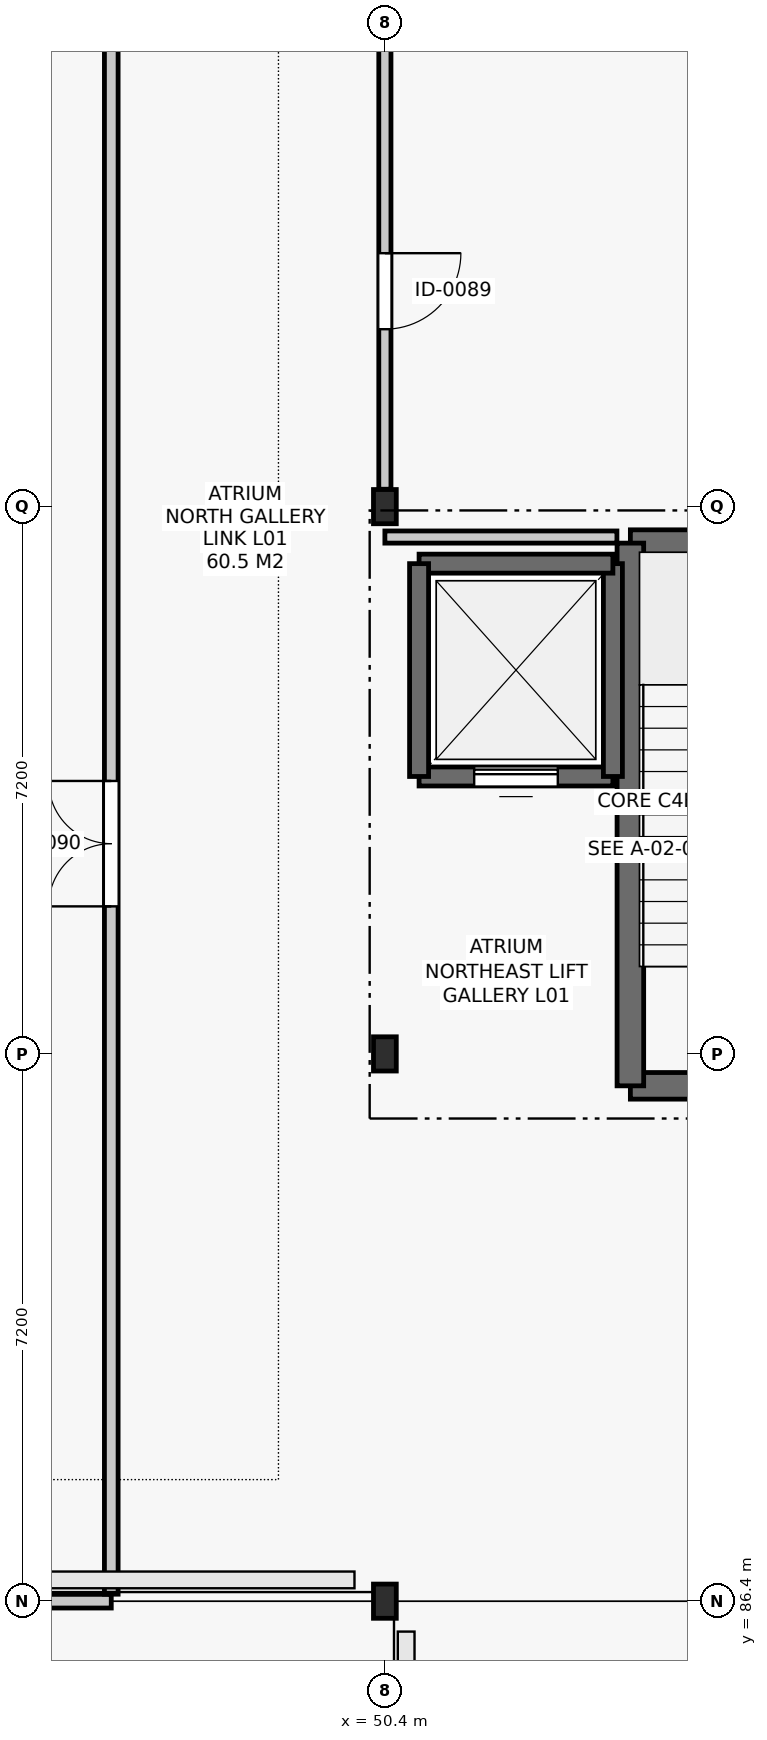
"""IFC4 building model, lengths in metres.
Left out: names, types, materials, properties, quantities, classifications, styles, units other than length and angle.
Written with IfcOpenShell. Run it as: python <this file> out.ifc"""

import sys

from ifc_helpers import new_model, si_unit, direction, frame, frame_2d, origin, origin_2d, place, context, subcontext, project, spatial, rectangle, i_section, extrude, element, fill, save


model = new_model("IFC4")
c1 = context("Model", 3, precision=1e-05, world=origin(), true_north=direction((0.0, 1.0)))
c2 = subcontext(c1, "Body", "Model", "MODEL_VIEW")
j1 = project(units=[si_unit("LENGTHUNIT", "METRE"), si_unit("PLANEANGLEUNIT", "RADIAN")], contexts=[c1])
p1 = place(None, origin())
s1 = spatial("IfcSite", under=j1, at=p1, CompositionType="ELEMENT")
p2 = place(p1, origin())
s2 = spatial("IfcBuilding", under=s1, at=p2, CompositionType="ELEMENT")
p3 = place(p2, frame((0.0, 0.0, 5.4)))
s3 = spatial("IfcBuildingStorey", under=s2, at=p3, CompositionType="ELEMENT", Elevation=5.4)
for number, where, z_axis, x_axis in (
    (1, (50.4, 86.4, 0.0), (0.0, 0.0, 1.0), (1.0, 0.0, 0.0)),
    (2, (50.4, 93.6, 0.0), (0.0, 0.0, 1.0), (1.0, 0.0, 0.0)),
    (3, (50.4, 100.8, 0.0), (0.0, 0.0, 1.0), (1.0, 0.0, 0.0)),
):
    element("IfcColumn", number, at=place(p3, frame(where, z_axis=z_axis, x_axis=x_axis)), inside=s3, PredefinedType="COLUMN", context=c2, shape_type="SweptSolid", body=[
        extrude(i_section(OverallWidth=0.3, OverallDepth=0.45, WebThickness=0.014, FlangeThickness=0.026, FilletRadius=0.027, at=origin_2d()), origin(), (0.0, 0.0, 1.0), 4.8),
    ])
p4 = place(p3, frame((53.63, 93.18, 0.0), z_axis=(0.0, 0.0, 1.0), x_axis=(1.0, 0.0, 0.0)))
e4 = element("IfcWall", 4, at=p4, inside=s3, PredefinedType="SHEAR", context=c2, shape_type="SweptSolid", body=[
    extrude(rectangle(XDim=3.44, YDim=0.35, at=frame_2d((1.72, 0.0))), origin(), (0.0, 0.0, 1.0), 4.52),
])
p5 = place(p4, frame((1.17, 0.0, 0.0)))
e5 = element("IfcOpeningElement", 5, at=p5, cuts=e4, PredefinedType="OPENING", context=c2, shape_type="SweptSolid", body=[
    extrude(rectangle(XDim=1.1, YDim=2.15, at=frame_2d((0.55, 1.075))), frame((0.0, 0.187, 0.0), z_axis=(0.0, -1.0, 0.0), x_axis=(1.0, 0.0, 0.0)), (0.0, 0.0, 1.0), 0.374),
])
p6 = place(p3, frame((57.07, 100.32, 0.0), z_axis=(0.0, 0.0, 1.0), x_axis=(-1.0, 0.0, 0.0)))
e6 = element("IfcWall", 6, at=p6, inside=s3, PredefinedType="SHEAR", context=c2, shape_type="SweptSolid", body=[
    extrude(rectangle(XDim=3.44, YDim=0.35, at=frame_2d((1.72, 0.0))), origin(), (0.0, 0.0, 1.0), 4.52),
])
p7 = place(p3, frame((53.63, 100.32, 0.0), z_axis=(0.0, 0.0, 1.0), x_axis=(0.0, -1.0, 0.0)))
e7 = element("IfcWall", 7, at=p7, inside=s3, PredefinedType="SHEAR", context=c2, shape_type="SweptSolid", body=[
    extrude(rectangle(XDim=7.14, YDim=0.35, at=frame_2d((3.57, 0.0))), origin(), (0.0, 0.0, 1.0), 4.52),
])
p8 = place(p3, frame((50.85, 97.25, 0.0), z_axis=(0.0, 0.0, 1.0), x_axis=(1.0, 0.0, 0.0)))
e8 = element("IfcWall", 8, at=p8, inside=s3, PredefinedType="SHEAR", context=c2, shape_type="SweptSolid", body=[
    extrude(rectangle(XDim=2.55, YDim=0.25, at=frame_2d((1.275, 0.0))), origin(), (0.0, 0.0, 1.0), 4.52),
])
p9 = place(p8, frame((0.725, 0.0, 0.0)))
e9 = element("IfcOpeningElement", 9, at=p9, cuts=e8, PredefinedType="OPENING", context=c2, shape_type="SweptSolid", body=[
    extrude(rectangle(XDim=1.1, YDim=2.1, at=frame_2d((0.55, 1.05))), frame((0.0, 0.137, 0.0), z_axis=(0.0, -1.0, 0.0), x_axis=(1.0, 0.0, 0.0)), (0.0, 0.0, 1.0), 0.274),
])
p10 = place(p3, frame((53.4, 97.25, 0.0), z_axis=(0.0, 0.0, 1.0), x_axis=(0.0, 1.0, 0.0)))
e10 = element("IfcWall", 10, at=p10, inside=s3, PredefinedType="SHEAR", context=c2, shape_type="SweptSolid", body=[
    extrude(rectangle(XDim=2.8, YDim=0.25, at=frame_2d((1.4, 0.0))), origin(), (0.0, 0.0, 1.0), 4.52),
])
p11 = place(p3, frame((53.4, 100.05, 0.0), z_axis=(0.0, 0.0, 1.0), x_axis=(-1.0, 0.0, 0.0)))
e11 = element("IfcWall", 11, at=p11, inside=s3, PredefinedType="SHEAR", context=c2, shape_type="SweptSolid", body=[
    extrude(rectangle(XDim=2.55, YDim=0.25, at=frame_2d((1.275, 0.0))), origin(), (0.0, 0.0, 1.0), 4.52),
])
p12 = place(p3, frame((50.85, 100.05, 0.0), z_axis=(0.0, 0.0, 1.0), x_axis=(0.0, -1.0, 0.0)))
e12 = element("IfcWall", 12, at=p12, inside=s3, PredefinedType="SHEAR", context=c2, shape_type="SweptSolid", body=[
    extrude(rectangle(XDim=2.8, YDim=0.25, at=frame_2d((1.4, 0.0))), origin(), (0.0, 0.0, 1.0), 4.52),
])
p13 = place(p3, frame((50.4, 100.4, 0.0), z_axis=(0.0, 0.0, 1.0), x_axis=(1.0, 0.0, 0.0)))
e13 = element("IfcWall", 13, at=p13, inside=s3, PredefinedType="PARTITIONING", context=c2, shape_type="SweptSolid", body=[
    extrude(rectangle(XDim=3.053, YDim=0.16, at=frame_2d((1.526, 0.0))), origin(), (0.0, 0.0, 1.0), 4.065),
])
p14 = place(p3, frame((43.354, 86.4, 0.0), z_axis=(0.0, 0.0, 1.0), x_axis=(1.0, 0.0, 0.0)))
e14 = element("IfcWall", 14, at=p14, inside=s3, PredefinedType="PARTITIONING", context=c2, shape_type="SweptSolid", body=[
    extrude(rectangle(XDim=3.446, YDim=0.18, at=frame_2d((1.723, 0.0))), origin(), (0.0, 0.0, 1.0), 4.505),
])
p15 = place(p3, frame((50.4, 101.029, 0.0), z_axis=(0.0, 0.0, 1.0), x_axis=(0.0, 1.0, 0.0)))
e15 = element("IfcWall", 15, at=p15, inside=s3, PredefinedType="PARTITIONING", context=c2, shape_type="SweptSolid", body=[
    extrude(rectangle(XDim=6.742, YDim=0.16, at=frame_2d((3.371, 0.0))), origin(), (0.0, 0.0, 1.0), 4.065),
])
p16 = place(p15, frame((2.105, 0.0, 0.0)))
e16 = element("IfcOpeningElement", 16, at=p16, cuts=e15, PredefinedType="OPENING", context=c2, shape_type="SweptSolid", body=[
    extrude(rectangle(XDim=1.0, YDim=2.15, at=frame_2d((0.5, 1.075))), frame((0.0, 0.092, 0.0), z_axis=(0.0, -1.0, 0.0), x_axis=(1.0, 0.0, 0.0)), (0.0, 0.0, 1.0), 0.184),
])
p17 = place(p3, frame((46.8, 86.492, 0.0), z_axis=(0.0, 0.0, 1.0), x_axis=(0.0, 1.0, 0.0)))
e17 = element("IfcWall", 17, at=p17, inside=s3, PredefinedType="PARTITIONING", context=c2, shape_type="SweptSolid", body=[
    extrude(rectangle(XDim=28.653, YDim=0.18, at=frame_2d((14.327, 0.0))), origin(), (0.0, 0.0, 1.0), 3.955),
])
p18 = place(p17, frame((9.049, 0.0, 0.0)))
e18 = element("IfcOpeningElement", 18, at=p18, cuts=e17, PredefinedType="OPENING", context=c2, shape_type="SweptSolid", body=[
    extrude(rectangle(XDim=1.65, YDim=2.25, at=frame_2d((0.825, 1.125))), frame((0.0, 0.102, 0.0), z_axis=(0.0, -1.0, 0.0), x_axis=(1.0, 0.0, 0.0)), (0.0, 0.0, 1.0), 0.204),
])
p19 = place(p9, origin())
e19 = element("IfcDoor", 19, at=p19, inside=s3, OperationType="SLIDING_TO_LEFT", PredefinedType="DOOR", context=c2, shape_type="SweptSolid", body=[
    extrude(rectangle(XDim=1.1, YDim=2.1, at=frame_2d((0.55, 1.05))), frame((0.0, 0.025, 0.0), z_axis=(0.0, -1.0, 0.0), x_axis=(1.0, 0.0, 0.0)), (0.0, 0.0, 1.0), 0.05),
])
fill(e9, e19)
p20 = place(p16, frame((1.0, 0.0, 0.0), z_axis=(0.0, 0.0, 1.0), x_axis=(-1.0, 0.0, 0.0)))
e20 = element("IfcDoor", 20, at=p20, inside=s3, OperationType="SINGLE_SWING_LEFT", PredefinedType="DOOR", context=c2, shape_type="SweptSolid", body=[
    extrude(rectangle(XDim=1.0, YDim=2.15, at=frame_2d((0.5, 1.075))), frame((0.0, 0.025, 0.0), z_axis=(0.0, -1.0, 0.0), x_axis=(1.0, 0.0, 0.0)), (0.0, 0.0, 1.0), 0.05),
])
fill(e16, e20)
p21 = place(p18, origin())
e21 = element("IfcDoor", 21, at=p21, inside=s3, OperationType="DOUBLE_DOOR_SINGLE_SWING", PredefinedType="DOOR", context=c2, shape_type="SweptSolid", body=[
    extrude(rectangle(XDim=1.65, YDim=2.25, at=frame_2d((0.825, 1.125))), frame((0.0, 0.025, 0.0), z_axis=(0.0, -1.0, 0.0), x_axis=(1.0, 0.0, 0.0)), (0.0, 0.0, 1.0), 0.05),
])
fill(e18, e21)
save(model, sys.argv[1])
